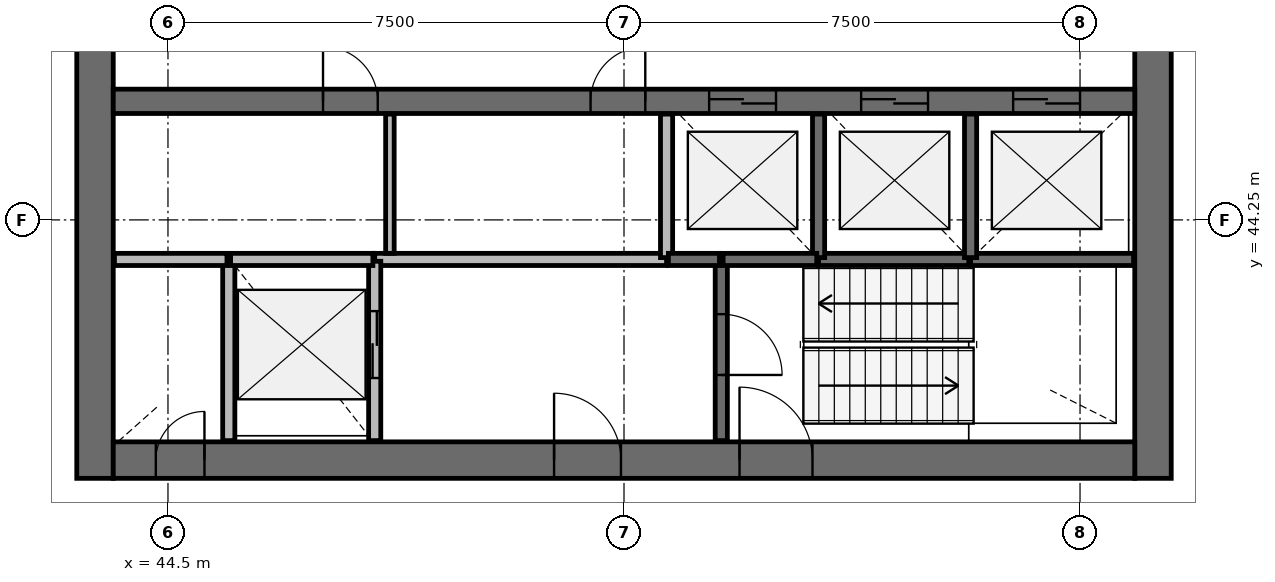
"""IFC4 building model, lengths in metres.
Left out: names, types, materials, properties, quantities, classifications, styles, units other than length and angle.
Written with IfcOpenShell. Run it as: python <this file> out.ifc"""

import sys

from ifc_helpers import new_model, si_unit, direction, frame, frame_2d, origin, place, context, subcontext, project, spatial, rectangle, extrude, source, transform, mapped, element, fill, save


model = new_model("IFC4")
c1 = context("Model", 3, precision=1e-05, world=origin(), true_north=direction((0.0, 1.0)))
c2 = subcontext(c1, "Body", "Model", "MODEL_VIEW")
j1 = project(units=[si_unit("LENGTHUNIT", "METRE"), si_unit("PLANEANGLEUNIT", "RADIAN")], contexts=[c1])
p1 = place(None, origin())
s1 = spatial("IfcSite", under=j1, at=p1, CompositionType="ELEMENT")
p2 = place(p1, origin())
s2 = spatial("IfcBuilding", under=s1, at=p2, CompositionType="ELEMENT")
p3 = place(p2, frame((0.0, 0.0, 191.6)))
s3 = spatial("IfcBuildingStorey", under=s2, at=p3, CompositionType="ELEMENT", Elevation=191.6)
p4 = place(p3, frame((60.7, 40.0, 0.0), z_axis=(0.0, 0.0, 1.0), x_axis=(0.0, 1.0, 0.0)))
e1 = element("IfcWall", 1, at=p4, inside=s3, PredefinedType="SHEAR", context=c2, shape_type="SweptSolid", body=[
    extrude(rectangle(XDim=16.0, YDim=0.6, at=frame_2d((8.0, 0.0))), origin(), (0.0, 0.0, 1.0), 3.9),
])
p5 = place(p4, frame((7.1, 0.0, 0.0)))
e2 = element("IfcOpeningElement", 2, at=p5, cuts=e1, PredefinedType="OPENING", context=c2, shape_type="SweptSolid", body=[
    extrude(rectangle(XDim=1.8, YDim=2.1, at=frame_2d((0.9, 1.05))), frame((0.0, 0.31, 0.0), z_axis=(0.0, -1.0, 0.0), x_axis=(1.0, 0.0, 0.0)), (0.0, 0.0, 1.0), 0.62),
])
p6 = place(p3, frame((43.3, 56.0, 0.0), z_axis=(0.0, 0.0, 1.0), x_axis=(0.0, -1.0, 0.0)))
e3 = element("IfcWall", 3, at=p6, inside=s3, PredefinedType="SHEAR", context=c2, shape_type="SweptSolid", body=[
    extrude(rectangle(XDim=16.0, YDim=0.6, at=frame_2d((8.0, 0.0))), origin(), (0.0, 0.0, 1.0), 3.9),
])
p7 = place(p6, frame((7.1, 0.0, 0.0)))
e4 = element("IfcOpeningElement", 4, at=p7, cuts=e3, PredefinedType="OPENING", context=c2, shape_type="SweptSolid", body=[
    extrude(rectangle(XDim=1.8, YDim=2.1, at=frame_2d((0.9, 1.05))), frame((0.0, 0.31, 0.0), z_axis=(0.0, -1.0, 0.0), x_axis=(1.0, 0.0, 0.0)), (0.0, 0.0, 1.0), 0.62),
])
p8 = place(p3, frame((43.6, 40.3, 0.0), z_axis=(0.0, 0.0, 1.0), x_axis=(1.0, 0.0, 0.0)))
e5 = element("IfcWall", 5, at=p8, inside=s3, PredefinedType="SHEAR", context=c2, shape_type="SweptSolid", body=[
    extrude(rectangle(XDim=16.8, YDim=0.6, at=frame_2d((8.4, 0.0))), origin(), (0.0, 0.0, 1.0), 3.9),
])
p9 = place(p8, frame((10.3, 0.0, 0.0)))
e6 = element("IfcOpeningElement", 6, at=p9, cuts=e5, PredefinedType="OPENING", context=c2, shape_type="SweptSolid", body=[
    extrude(rectangle(XDim=1.2, YDim=2.1, at=frame_2d((0.6, 1.05))), frame((0.0, 0.31, 0.0), z_axis=(0.0, -1.0, 0.0), x_axis=(1.0, 0.0, 0.0)), (0.0, 0.0, 1.0), 0.62),
])
p10 = place(p8, frame((7.25, 0.0, 0.0)))
e7 = element("IfcOpeningElement", 7, at=p10, cuts=e5, PredefinedType="OPENING", context=c2, shape_type="SweptSolid", body=[
    extrude(rectangle(XDim=1.1, YDim=2.1, at=frame_2d((0.55, 1.05))), frame((0.0, 0.31, 0.0), z_axis=(0.0, -1.0, 0.0), x_axis=(1.0, 0.0, 0.0)), (0.0, 0.0, 1.0), 0.62),
])
p11 = place(p8, frame((0.7, 0.0, 0.0)))
e8 = element("IfcOpeningElement", 8, at=p11, cuts=e5, PredefinedType="OPENING", context=c2, shape_type="SweptSolid", body=[
    extrude(rectangle(XDim=0.8, YDim=2.1, at=frame_2d((0.4, 1.05))), frame((0.0, 0.31, 0.0), z_axis=(0.0, -1.0, 0.0), x_axis=(1.0, 0.0, 0.0)), (0.0, 0.0, 1.0), 0.62),
])
p12 = place(p3, frame((43.6, 46.2, 0.0), z_axis=(0.0, 0.0, 1.0), x_axis=(1.0, 0.0, 0.0)))
e9 = element("IfcWall", 9, at=p12, inside=s3, PredefinedType="SHEAR", context=c2, shape_type="SweptSolid", body=[
    extrude(rectangle(XDim=16.8, YDim=0.4, at=frame_2d((8.4, 0.0))), origin(), (0.0, 0.0, 1.0), 3.9),
])
p13 = place(p12, frame((9.8, 0.0, 0.0)))
e10 = element("IfcOpeningElement", 10, at=p13, cuts=e9, PredefinedType="OPENING", context=c2, shape_type="SweptSolid", body=[
    extrude(rectangle(XDim=1.1, YDim=2.1, at=frame_2d((0.55, 1.05))), frame((0.0, 0.21, 0.0), z_axis=(0.0, -1.0, 0.0), x_axis=(1.0, 0.0, 0.0)), (0.0, 0.0, 1.0), 0.42),
])
p14 = place(p12, frame((12.3, 0.0, 0.0)))
e11 = element("IfcOpeningElement", 11, at=p14, cuts=e9, PredefinedType="OPENING", context=c2, shape_type="SweptSolid", body=[
    extrude(rectangle(XDim=1.1, YDim=2.1, at=frame_2d((0.55, 1.05))), frame((0.0, 0.21, 0.0), z_axis=(0.0, -1.0, 0.0), x_axis=(1.0, 0.0, 0.0)), (0.0, 0.0, 1.0), 0.42),
])
p15 = place(p12, frame((14.8, 0.0, 0.0)))
e12 = element("IfcOpeningElement", 12, at=p15, cuts=e9, PredefinedType="OPENING", context=c2, shape_type="SweptSolid", body=[
    extrude(rectangle(XDim=1.1, YDim=2.1, at=frame_2d((0.55, 1.05))), frame((0.0, 0.21, 0.0), z_axis=(0.0, -1.0, 0.0), x_axis=(1.0, 0.0, 0.0)), (0.0, 0.0, 1.0), 0.42),
])
p16 = place(p12, frame((3.45, 0.0, 0.0)))
e13 = element("IfcOpeningElement", 13, at=p16, cuts=e9, PredefinedType="OPENING", context=c2, shape_type="SweptSolid", body=[
    extrude(rectangle(XDim=0.9, YDim=2.1, at=frame_2d((0.45, 1.05))), frame((0.0, 0.21, 0.0), z_axis=(0.0, -1.0, 0.0), x_axis=(1.0, 0.0, 0.0)), (0.0, 0.0, 1.0), 0.42),
])
p17 = place(p12, frame((7.85, 0.0, 0.0)))
e14 = element("IfcOpeningElement", 14, at=p17, cuts=e9, PredefinedType="OPENING", context=c2, shape_type="SweptSolid", body=[
    extrude(rectangle(XDim=0.9, YDim=2.1, at=frame_2d((0.45, 1.05))), frame((0.0, 0.21, 0.0), z_axis=(0.0, -1.0, 0.0), x_axis=(1.0, 0.0, 0.0)), (0.0, 0.0, 1.0), 0.42),
])
p18 = place(p3, frame((52.7, 43.6, 0.0), z_axis=(0.0, 0.0, 1.0), x_axis=(-1.0, 0.0, 0.0)))
e15 = element("IfcWall", 15, at=p18, inside=s3, PredefinedType="SOLIDWALL", context=c2, shape_type="SweptSolid", body=[
    extrude(rectangle(XDim=4.8, YDim=0.2, at=frame_2d((2.4, 0.0))), origin(), (0.0, 0.0, 1.0), 3.58),
])
p19 = place(p3, frame((45.5, 43.6, 0.0), z_axis=(0.0, 0.0, 1.0), x_axis=(0.0, -1.0, 0.0)))
e16 = element("IfcWall", 16, at=p19, inside=s3, PredefinedType="SOLIDWALL", context=c2, shape_type="SweptSolid", body=[
    extrude(rectangle(XDim=2.98, YDim=0.2, at=frame_2d((1.49, 0.0))), origin(), (0.0, 0.0, 1.0), 3.58),
])
p20 = place(p3, frame((47.9, 40.62, 0.0), z_axis=(0.0, 0.0, 1.0), x_axis=(0.0, 1.0, 0.0)))
e17 = element("IfcWall", 17, at=p20, inside=s3, PredefinedType="SOLIDWALL", context=c2, shape_type="SweptSolid", body=[
    extrude(rectangle(XDim=2.95, YDim=0.2, at=frame_2d((1.475, 0.0))), origin(), (0.0, 0.0, 1.0), 3.58),
])
p21 = place(p20, frame((1.03, 0.0, 0.0)))
e18 = element("IfcOpeningElement", 18, at=p21, cuts=e17, PredefinedType="OPENING", context=c2, shape_type="SweptSolid", body=[
    extrude(rectangle(XDim=1.1, YDim=2.1, at=frame_2d((0.55, 1.05))), frame((0.0, 0.11, 0.0), z_axis=(0.0, -1.0, 0.0), x_axis=(1.0, 0.0, 0.0)), (0.0, 0.0, 1.0), 0.22),
])
p22 = place(p3, frame((53.6, 43.6, 0.0), z_axis=(0.0, 0.0, 1.0), x_axis=(0.0, -1.0, 0.0)))
e19 = element("IfcWall", 19, at=p22, inside=s3, PredefinedType="SOLIDWALL", context=c2, shape_type="SweptSolid", body=[
    extrude(rectangle(XDim=2.98, YDim=0.2, at=frame_2d((1.49, 0.0))), origin(), (0.0, 0.0, 1.0), 3.58),
])
p23 = place(p22, frame((0.9, 0.0, 0.0)))
e20 = element("IfcOpeningElement", 20, at=p23, cuts=e19, PredefinedType="OPENING", context=c2, shape_type="SweptSolid", body=[
    extrude(rectangle(XDim=1.0, YDim=2.1, at=frame_2d((0.5, 1.05))), frame((0.0, 0.11, 0.0), z_axis=(0.0, -1.0, 0.0), x_axis=(1.0, 0.0, 0.0)), (0.0, 0.0, 1.0), 0.22),
])
p24 = place(p3, frame((57.7, 43.6, 0.0), z_axis=(0.0, 0.0, 1.0), x_axis=(1.0, 0.0, 0.0)))
e21 = element("IfcWall", 21, at=p24, inside=s3, PredefinedType="SOLIDWALL", context=c2, shape_type="SweptSolid", body=[
    extrude(rectangle(XDim=2.68, YDim=0.2, at=frame_2d((1.34, 0.0))), origin(), (0.0, 0.0, 1.0), 3.58),
])
p25 = place(p3, frame((55.2, 43.6, 0.0), z_axis=(0.0, 0.0, 1.0), x_axis=(1.0, 0.0, 0.0)))
e22 = element("IfcWall", 22, at=p25, inside=s3, PredefinedType="SOLIDWALL", context=c2, shape_type="SweptSolid", body=[
    extrude(rectangle(XDim=2.47, YDim=0.2, at=frame_2d((1.235, 0.0))), origin(), (0.0, 0.0, 1.0), 3.58),
])
p26 = place(p3, frame((47.87, 43.6, 0.0), z_axis=(0.0, 0.0, 1.0), x_axis=(-1.0, 0.0, 0.0)))
e23 = element("IfcWall", 23, at=p26, inside=s3, PredefinedType="SOLIDWALL", context=c2, shape_type="SweptSolid", body=[
    extrude(rectangle(XDim=2.34, YDim=0.2, at=frame_2d((1.17, 0.0))), origin(), (0.0, 0.0, 1.0), 3.58),
])
for number, where, z_axis, x_axis in (
    (24, (52.7, 45.99, 0.0), (0.0, 0.0, 1.0), (0.0, -1.0, 0.0)),
    (25, (55.2, 43.63, 0.0), (0.0, 0.0, 1.0), (0.0, 1.0, 0.0)),
    (26, (57.7, 43.63, 0.0), (0.0, 0.0, 1.0), (0.0, 1.0, 0.0)),
):
    element("IfcWall", number, at=place(p3, frame(where, z_axis=z_axis, x_axis=x_axis)), inside=s3, PredefinedType="SOLIDWALL", context=c2, shape_type="SweptSolid", body=[
        extrude(rectangle(XDim=2.36, YDim=0.2, at=frame_2d((1.18, 0.0))), origin(), (0.0, 0.0, 1.0), 3.58),
    ])
p27 = place(p3, frame((45.47, 43.6, 0.0), z_axis=(0.0, 0.0, 1.0), x_axis=(-1.0, 0.0, 0.0)))
e27 = element("IfcWall", 27, at=p27, inside=s3, PredefinedType="SOLIDWALL", context=c2, shape_type="SweptSolid", body=[
    extrude(rectangle(XDim=1.85, YDim=0.2, at=frame_2d((0.925, 0.0))), origin(), (0.0, 0.0, 1.0), 3.58),
])
p28 = place(p3, frame((53.63, 43.6, 0.0), z_axis=(0.0, 0.0, 1.0), x_axis=(1.0, 0.0, 0.0)))
e28 = element("IfcWall", 28, at=p28, inside=s3, PredefinedType="SOLIDWALL", context=c2, shape_type="SweptSolid", body=[
    extrude(rectangle(XDim=1.54, YDim=0.2, at=frame_2d((0.77, 0.0))), origin(), (0.0, 0.0, 1.0), 3.58),
])
p29 = place(p3, frame((52.73, 43.6, 0.0), z_axis=(0.0, 0.0, 1.0), x_axis=(1.0, 0.0, 0.0)))
e29 = element("IfcWall", 29, at=p29, inside=s3, PredefinedType="SOLIDWALL", context=c2, shape_type="SweptSolid", body=[
    extrude(rectangle(XDim=0.84, YDim=0.2, at=frame_2d((0.42, 0.0))), origin(), (0.0, 0.0, 1.0), 3.58),
])
p30 = place(p3, frame((48.15, 43.7, 0.0), z_axis=(0.0, 0.0, 1.0), x_axis=(0.0, 1.0, 0.0)))
e30 = element("IfcWall", 30, at=p30, inside=s3, PredefinedType="PARTITIONING", context=c2, shape_type="SweptSolid", body=[
    extrude(rectangle(XDim=2.29, YDim=0.14, at=frame_2d((1.145, 0.0))), origin(), (0.0, 0.0, 1.0), 2.88),
])
m1 = source(origin(), c2, "Body", "SweptSolid", [
    extrude(rectangle(XDim=1.1, YDim=2.1, at=frame_2d((0.55, 1.05))), frame((0.0, 0.025, 0.0), z_axis=(0.0, -1.0, 0.0), x_axis=(1.0, 0.0, 0.0)), (0.0, 0.0, 1.0), 0.05),
])
p31 = place(p13, origin())
e31 = element("IfcDoor", 31, at=p31, inside=s3, OperationType="DOUBLE_DOOR_SLIDING", PredefinedType="USERDEFINED", context=c2, shape_type="MappedRepresentation", body=[
    mapped(m1, transform((0.0, 0.0, 0.0), scale=1.0)),
])
fill(e10, e31)
p32 = place(p14, origin())
e32 = element("IfcDoor", 32, at=p32, inside=s3, OperationType="DOUBLE_DOOR_SLIDING", PredefinedType="USERDEFINED", context=c2, shape_type="MappedRepresentation", body=[
    mapped(m1, transform((0.0, 0.0, 0.0), scale=1.0)),
])
fill(e11, e32)
p33 = place(p15, origin())
e33 = element("IfcDoor", 33, at=p33, inside=s3, OperationType="DOUBLE_DOOR_SLIDING", PredefinedType="USERDEFINED", context=c2, shape_type="MappedRepresentation", body=[
    mapped(m1, transform((0.0, 0.0, 0.0), scale=1.0)),
])
fill(e12, e33)
p34 = place(p21, origin())
e34 = element("IfcDoor", 34, at=p34, inside=s3, OperationType="DOUBLE_DOOR_SLIDING", PredefinedType="USERDEFINED", context=c2, shape_type="MappedRepresentation", body=[
    mapped(m1, transform((0.0, 0.0, 0.0), scale=1.0)),
])
fill(e18, e34)
m2 = source(origin(), c2, "Body", "SweptSolid", [
    extrude(rectangle(XDim=1.2, YDim=2.1, at=frame_2d((0.6, 1.05))), frame((0.0, 0.025, 0.0), z_axis=(0.0, -1.0, 0.0), x_axis=(1.0, 0.0, 0.0)), (0.0, 0.0, 1.0), 0.05),
])
p35 = place(p9, origin())
e35 = element("IfcDoor", 35, at=p35, inside=s3, OperationType="SINGLE_SWING_LEFT", PredefinedType="DOOR", context=c2, shape_type="MappedRepresentation", body=[
    mapped(m2, transform((0.0, 0.0, 0.0), scale=1.0)),
])
fill(e6, e35)
m3 = source(origin(), c2, "Body", "SweptSolid", [
    extrude(rectangle(XDim=1.0, YDim=2.1, at=frame_2d((0.5, 1.05))), frame((0.0, 0.025, 0.0), z_axis=(0.0, -1.0, 0.0), x_axis=(1.0, 0.0, 0.0)), (0.0, 0.0, 1.0), 0.05),
])
p36 = place(p23, origin())
e36 = element("IfcDoor", 36, at=p36, inside=s3, OperationType="SINGLE_SWING_RIGHT", PredefinedType="DOOR", context=c2, shape_type="MappedRepresentation", body=[
    mapped(m3, transform((0.0, 0.0, 0.0), scale=1.0)),
])
fill(e20, e36)
m4 = source(origin(), c2, "Body", "SweptSolid", [
    extrude(rectangle(XDim=1.1, YDim=2.1, at=frame_2d((0.55, 1.05))), frame((0.0, 0.025, 0.0), z_axis=(0.0, -1.0, 0.0), x_axis=(1.0, 0.0, 0.0)), (0.0, 0.0, 1.0), 0.05),
])
p37 = place(p10, origin())
e37 = element("IfcDoor", 37, at=p37, inside=s3, OperationType="SINGLE_SWING_LEFT", PredefinedType="DOOR", context=c2, shape_type="MappedRepresentation", body=[
    mapped(m4, transform((0.0, 0.0, 0.0), scale=1.0)),
])
fill(e7, e37)
m5 = source(origin(), c2, "Body", "SweptSolid", [
    extrude(rectangle(XDim=0.8, YDim=2.1, at=frame_2d((0.4, 1.05))), frame((0.0, 0.025, 0.0), z_axis=(0.0, -1.0, 0.0), x_axis=(1.0, 0.0, 0.0)), (0.0, 0.0, 1.0), 0.05),
])
p38 = place(p11, origin())
e38 = element("IfcDoor", 38, at=p38, inside=s3, OperationType="SINGLE_SWING_RIGHT", PredefinedType="DOOR", context=c2, shape_type="MappedRepresentation", body=[
    mapped(m5, transform((0.0, 0.0, 0.0), scale=1.0)),
])
fill(e8, e38)
m6 = source(origin(), c2, "Body", "SweptSolid", [
    extrude(rectangle(XDim=0.9, YDim=2.1, at=frame_2d((0.45, 1.05))), frame((0.0, 0.025, 0.0), z_axis=(0.0, -1.0, 0.0), x_axis=(1.0, 0.0, 0.0)), (0.0, 0.0, 1.0), 0.05),
])
p39 = place(p16, origin())
e39 = element("IfcDoor", 39, at=p39, inside=s3, OperationType="SINGLE_SWING_LEFT", PredefinedType="DOOR", context=c2, shape_type="MappedRepresentation", body=[
    mapped(m6, transform((0.0, 0.0, 0.0), scale=1.0)),
])
fill(e13, e39)
p40 = place(p17, origin())
e40 = element("IfcDoor", 40, at=p40, inside=s3, OperationType="SINGLE_SWING_RIGHT", PredefinedType="DOOR", context=c2, shape_type="MappedRepresentation", body=[
    mapped(m6, transform((0.0, 0.0, 0.0), scale=1.0)),
])
fill(e14, e40)
save(model, sys.argv[1])
